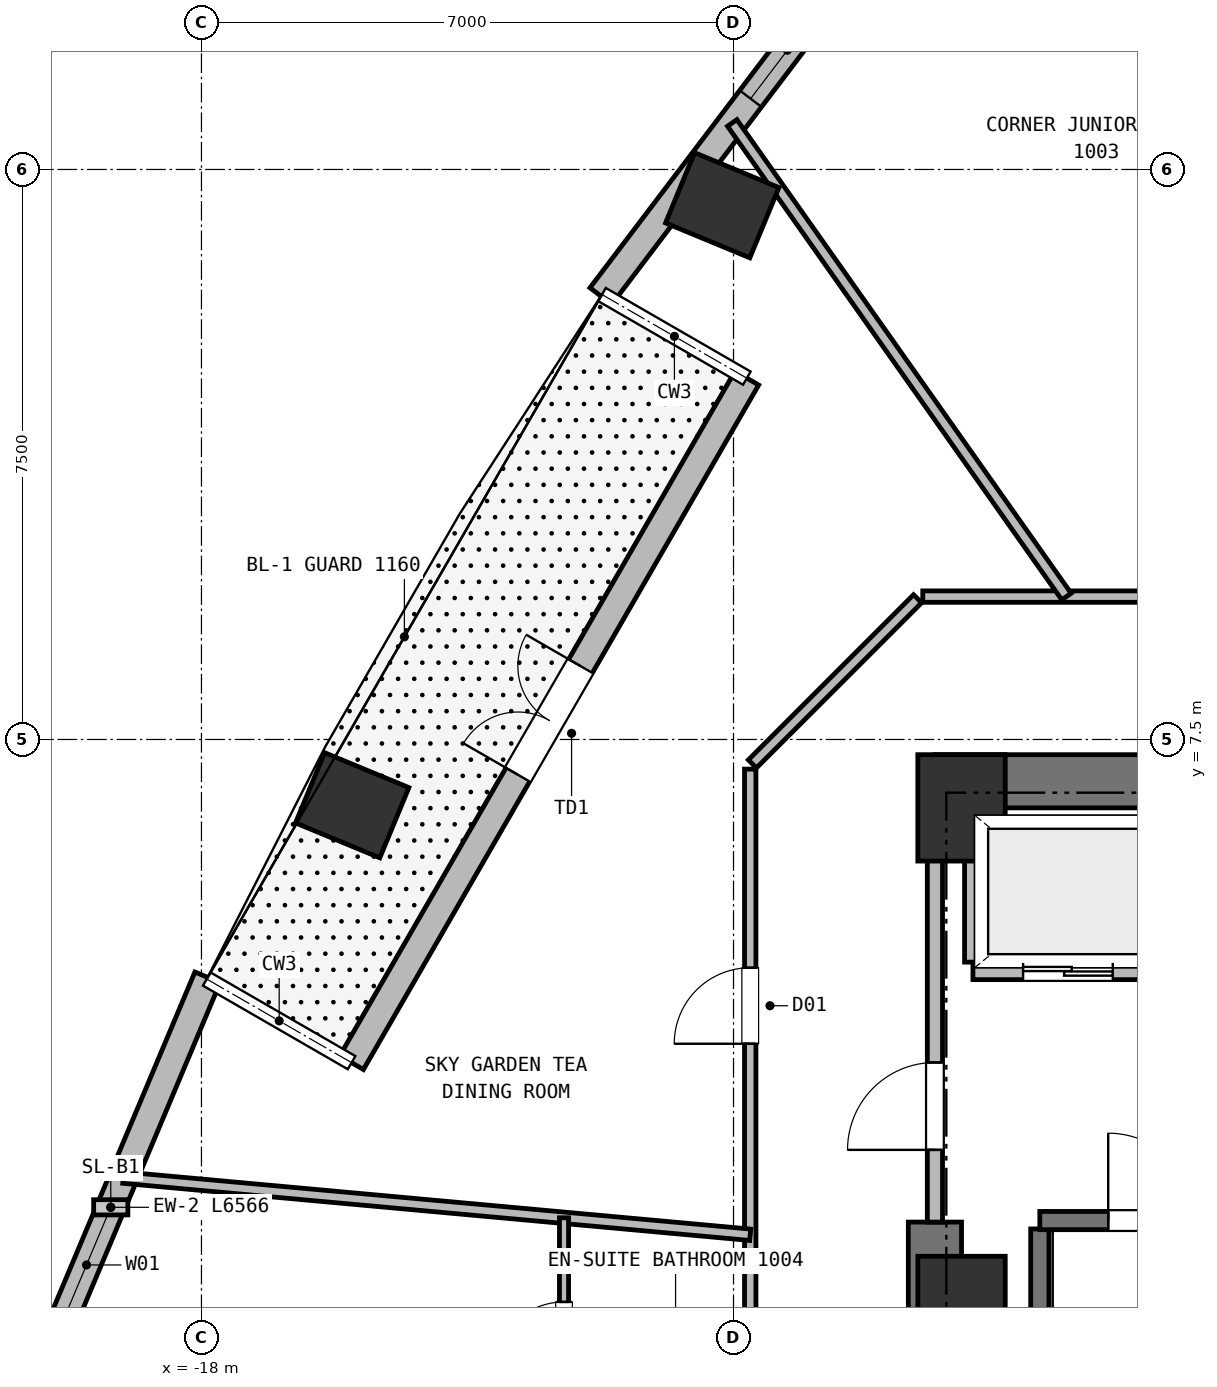
"""IFC4 building model, lengths in metres.
Left out: names, types, materials, properties, quantities, classifications, styles, units other than length and angle.
Written with IfcOpenShell. Run it as: python <this file> out.ifc"""

import sys

from ifc_helpers import new_model, si_unit, direction, frame, frame_2d, origin, origin_2d, place, context, subcontext, project, spatial, rectangle, extrude, element, fill, save


model = new_model("IFC4")
c1 = context("Model", 3, precision=1e-05, world=origin(), true_north=direction((0.0, 1.0)))
c2 = subcontext(c1, "Body", "Model", "MODEL_VIEW")
j1 = project(units=[si_unit("LENGTHUNIT", "METRE"), si_unit("PLANEANGLEUNIT", "RADIAN")], contexts=[c1])
p1 = place(None, origin())
s1 = spatial("IfcSite", under=j1, at=p1, CompositionType="ELEMENT")
p2 = place(p1, origin())
s2 = spatial("IfcBuilding", under=s1, at=p2, CompositionType="ELEMENT")
p3 = place(p2, frame((0.0, 0.0, 34.25)))
s3 = spatial("IfcBuildingStorey", under=s2, at=p3, CompositionType="ELEMENT", Elevation=34.25)
for number, where, z_axis, x_axis in (
    (1, (-8.0, 6.6, 0.0), (0.0, 0.0, 1.0), (1.0, 0.0, 0.0)),
    (2, (-8.0, 0.0, 0.0), (0.0, 0.0, 1.0), (1.0, 0.0, 0.0)),
):
    element("IfcColumn", number, at=place(p3, frame(where, z_axis=z_axis, x_axis=x_axis)), inside=s3, PredefinedType="COLUMN", context=c2, shape_type="SweptSolid", body=[
        extrude(rectangle(XDim=1.15, YDim=1.4, at=origin_2d()), origin(), (0.0, 0.0, 1.0), 3.75),
    ])
p4 = place(p3, frame((-8.35, 6.95, 0.0), z_axis=(0.0, 0.0, 1.0), x_axis=(1.0, 0.0, 0.0)))
e3 = element("IfcWall", 3, at=p4, inside=s3, PredefinedType="SHEAR", context=c2, shape_type="SweptSolid", body=[
    extrude(rectangle(XDim=16.7, YDim=0.7, at=frame_2d((8.35, 0.0))), origin(), (0.0, 0.0, 1.0), 3.5),
])
p5 = place(p3, frame((-8.35, -6.95, 0.0), z_axis=(0.0, 0.0, 1.0), x_axis=(0.0, 1.0, 0.0)))
e4 = element("IfcWall", 4, at=p5, inside=s3, PredefinedType="SHEAR", context=c2, shape_type="SweptSolid", body=[
    extrude(rectangle(XDim=8.1, YDim=0.7, at=frame_2d((4.05, 0.0))), origin(), (0.0, 0.0, 1.0), 3.5),
])
for number, where, z_axis, x_axis in (
    (5, (-11.148, 14.529, 0.0), (0.0, 0.0, 1.0), (0.383, 0.924, 0.0)),
    (6, (-16.017, 6.635, 0.0), (0.0, 0.0, 1.0), (0.383, 0.924, 0.0)),
):
    element("IfcColumn", number, at=place(p3, frame(where, z_axis=z_axis, x_axis=x_axis)), inside=s3, PredefinedType="COLUMN", context=c2, shape_type="SweptSolid", body=[
        extrude(rectangle(XDim=1.0, YDim=1.2, at=origin_2d()), origin(), (0.0, 0.0, 1.0), 3.75),
    ])
p6 = place(p3, frame((-16.025, 3.248, 0.0), z_axis=(0.0, 0.0, 1.0), x_axis=(0.499999493275, 0.866025696342, 0.0)))
e7 = element("IfcWall", 7, at=p6, inside=s3, PredefinedType="SOLIDWALL", context=c2, shape_type="SweptSolid", body=[
    extrude(rectangle(XDim=10.4, YDim=0.36, at=frame_2d((5.2, 0.0))), origin(), (0.0, 0.0, 1.0), 3.5),
])
p7 = place(p6, frame((4.375, 0.0, 0.0)))
e8 = element("IfcOpeningElement", 8, at=p7, cuts=e7, PredefinedType="OPENING", context=c2, shape_type="SweptSolid", body=[
    extrude(rectangle(XDim=1.65, YDim=2.25, at=frame_2d((0.825, 1.125))), frame((0.0, 0.19, 0.0), z_axis=(0.0, -1.0, 0.0), x_axis=(1.0, 0.0, 0.0)), (0.0, 0.0, 1.0), 0.38),
])
p8 = place(p3, frame((-12.745, 13.334, 0.0), z_axis=(0.0, 0.0, 1.0), x_axis=(0.604405198851, 0.796677071091, 0.0)))
e9 = element("IfcWall", 9, at=p8, inside=s3, PredefinedType="SOLIDWALL", context=c2, shape_type="SweptSolid", body=[
    extrude(rectangle(XDim=6.566, YDim=0.36, at=frame_2d((3.283, 0.0))), origin(), (0.0, 0.0, 1.0), 2.93),
])
p9 = place(p8, frame((3.26, 0.0, 0.72)))
e10 = element("IfcOpeningElement", 10, at=p9, cuts=e9, PredefinedType="OPENING", context=c2, shape_type="SweptSolid", body=[
    extrude(rectangle(XDim=1.6, YDim=1.88, at=frame_2d((0.8, 0.94))), frame((0.0, 0.19, 0.0), z_axis=(0.0, -1.0, 0.0), x_axis=(1.0, 0.0, 0.0)), (0.0, 0.0, 1.0), 0.38),
])
p10 = place(p3, frame((-20.466, -1.682, 0.0), z_axis=(0.0, 0.0, 1.0), x_axis=(0.387744465456, 0.921766906277, 0.0)))
e11 = element("IfcWall", 11, at=p10, inside=s3, PredefinedType="SOLIDWALL", context=c2, shape_type="SweptSolid", body=[
    extrude(rectangle(XDim=6.566, YDim=0.36, at=frame_2d((3.283, 0.0))), origin(), (0.0, 0.0, 1.0), 3.5),
])
p11 = place(p10, frame((1.66, 0.0, 0.72)))
e12 = element("IfcOpeningElement", 12, at=p11, cuts=e11, PredefinedType="OPENING", context=c2, shape_type="SweptSolid", body=[
    extrude(rectangle(XDim=1.6, YDim=1.88, at=frame_2d((0.8, 0.94))), frame((0.0, 0.19, 0.0), z_axis=(0.0, -1.0, 0.0), x_axis=(1.0, 0.0, 0.0)), (0.0, 0.0, 1.0), 0.38),
])
p12 = place(p3, frame((-6.97, -6.16, 0.0), z_axis=(0.0, 0.0, 1.0), x_axis=(0.0, 1.0, 0.0)))
e13 = element("IfcWall", 13, at=p12, inside=s3, PredefinedType="SHEAR", context=c2, shape_type="SweptSolid", body=[
    extrude(rectangle(XDim=7.22, YDim=0.24, at=frame_2d((3.61, 0.0))), origin(), (0.0, 0.0, 1.0), 3.5),
])
p13 = place(p3, frame((-6.97, 1.17, 0.0), z_axis=(0.0, 0.0, 1.0), x_axis=(1.0, 0.0, 0.0)))
e14 = element("IfcWall", 14, at=p13, inside=s3, PredefinedType="SHEAR", context=c2, shape_type="SweptSolid", body=[
    extrude(rectangle(XDim=2.96, YDim=0.24, at=frame_2d((1.48, 0.0))), origin(), (0.0, 0.0, 1.0), 3.5),
])
p14 = place(p13, frame((0.9, 0.0, 0.0)))
e15 = element("IfcOpeningElement", 15, at=p14, cuts=e14, PredefinedType="OPENING", context=c2, shape_type="SweptSolid", body=[
    extrude(rectangle(XDim=1.15, YDim=2.15, at=frame_2d((0.575, 1.075))), frame((0.0, 0.13, 0.0), z_axis=(0.0, -1.0, 0.0), x_axis=(1.0, 0.0, 0.0)), (0.0, 0.0, 1.0), 0.26),
])
p15 = place(p3, frame((-7.85, 4.45, 0.0), z_axis=(0.0, 0.0, 1.0), x_axis=(1.0, 0.0, 0.0)))
e16 = element("IfcWall", 16, at=p15, inside=s3, PredefinedType="PARTITIONING", context=c2, shape_type="SweptSolid", body=[
    extrude(rectangle(XDim=2.5, YDim=0.22, at=frame_2d((1.25, 0.0))), origin(), (0.0, 0.0, 1.0), 3.5),
])
p16 = place(p15, frame((0.66, 0.0, 0.0)))
e17 = element("IfcOpeningElement", 17, at=p16, cuts=e16, PredefinedType="OPENING", context=c2, shape_type="SweptSolid", body=[
    extrude(rectangle(XDim=1.18, YDim=2.15, at=frame_2d((0.59, 1.075))), frame((0.0, 0.12, 0.0), z_axis=(0.0, -1.0, 0.0), x_axis=(1.0, 0.0, 0.0)), (0.0, 0.0, 1.0), 0.24),
])
p17 = place(p3, frame((-7.85, 4.57, 0.0), z_axis=(0.0, 0.0, 1.0), x_axis=(0.0, 1.0, 0.0)))
e18 = element("IfcWall", 18, at=p17, inside=s3, PredefinedType="PARTITIONING", context=c2, shape_type="SweptSolid", body=[
    extrude(rectangle(XDim=2.03, YDim=0.22, at=frame_2d((1.015, 0.0))), origin(), (0.0, 0.0, 1.0), 3.08),
])
p18 = place(p3, frame((-8.35, 1.15, 0.0), z_axis=(0.0, 0.0, 1.0), x_axis=(0.0, 1.0, 0.0)))
e19 = element("IfcWall", 19, at=p18, inside=s3, PredefinedType="PARTITIONING", context=c2, shape_type="SweptSolid", body=[
    extrude(rectangle(XDim=5.4, YDim=0.2, at=frame_2d((2.7, 0.0))), origin(), (0.0, 0.0, 1.0), 3.5),
])
p19 = place(p18, frame((0.95, 0.0, 0.0)))
e20 = element("IfcOpeningElement", 20, at=p19, cuts=e19, PredefinedType="OPENING", context=c2, shape_type="SweptSolid", body=[
    extrude(rectangle(XDim=1.15, YDim=2.15, at=frame_2d((0.575, 1.075))), frame((0.0, 0.11, 0.0), z_axis=(0.0, -1.0, 0.0), x_axis=(1.0, 0.0, 0.0)), (0.0, 0.0, 1.0), 0.22),
])
p20 = place(p3, frame((-8.51, 9.38, 0.0), z_axis=(0.0, 0.0, 1.0), x_axis=(1.0, 0.0, 0.0)))
e21 = element("IfcWall", 21, at=p20, inside=s3, PredefinedType="PARTITIONING", context=c2, shape_type="SweptSolid", body=[
    extrude(rectangle(XDim=17.02, YDim=0.15, at=frame_2d((8.51, 0.0))), origin(), (0.0, 0.0, 1.0), 3.5),
])
p21 = place(p20, frame((13.545, 0.0, 0.0)))
e22 = element("IfcOpeningElement", 22, at=p21, cuts=e21, PredefinedType="OPENING", context=c2, shape_type="SweptSolid", body=[
    extrude(rectangle(XDim=1.0, YDim=2.15, at=frame_2d((0.5, 1.075))), frame((0.0, 0.085, 0.0), z_axis=(0.0, -1.0, 0.0), x_axis=(1.0, 0.0, 0.0)), (0.0, 0.0, 1.0), 0.17),
])
p22 = place(p20, frame((3.095, 0.0, 0.0)))
e23 = element("IfcOpeningElement", 23, at=p22, cuts=e21, PredefinedType="OPENING", context=c2, shape_type="SweptSolid", body=[
    extrude(rectangle(XDim=1.06, YDim=2.15, at=frame_2d((0.53, 1.075))), frame((0.0, 0.085, 0.0), z_axis=(0.0, -1.0, 0.0), x_axis=(1.0, 0.0, 0.0)), (0.0, 0.0, 1.0), 0.17),
])
p23 = place(p20, frame((8.402, 0.0, 0.0)))
e24 = element("IfcOpeningElement", 24, at=p23, cuts=e21, PredefinedType="OPENING", context=c2, shape_type="SweptSolid", body=[
    extrude(rectangle(XDim=1.06, YDim=2.15, at=frame_2d((0.53, 1.075))), frame((0.0, 0.085, 0.0), z_axis=(0.0, -1.0, 0.0), x_axis=(1.0, 0.0, 0.0)), (0.0, 0.0, 1.0), 0.17),
])
p24 = place(p3, frame((-10.752, 7.178, 0.0), z_axis=(0.0, 0.0, 1.0), x_axis=(0.707067066127, 0.707146494016, 0.0)))
e25 = element("IfcWall", 25, at=p24, inside=s3, PredefinedType="PARTITIONING", context=c2, shape_type="SweptSolid", body=[
    extrude(rectangle(XDim=3.074, YDim=0.15, at=frame_2d((1.537, 0.0))), origin(), (0.0, 0.0, 1.0), 3.5),
])
p25 = place(p3, frame((-10.78, -7.11, 0.0), z_axis=(0.0, 0.0, 1.0), x_axis=(0.0, 1.0, 0.0)))
e26 = element("IfcWall", 26, at=p25, inside=s3, PredefinedType="PARTITIONING", context=c2, shape_type="SweptSolid", body=[
    extrude(rectangle(XDim=14.22, YDim=0.15, at=frame_2d((7.11, 0.0))), origin(), (0.0, 0.0, 1.0), 3.12),
])
p26 = place(p25, frame((10.606, 0.0, 0.0)))
e27 = element("IfcOpeningElement", 27, at=p26, cuts=e26, PredefinedType="OPENING", context=c2, shape_type="SweptSolid", body=[
    extrude(rectangle(XDim=1.0, YDim=2.15, at=frame_2d((0.5, 1.075))), frame((0.0, 0.085, 0.0), z_axis=(0.0, -1.0, 0.0), x_axis=(1.0, 0.0, 0.0)), (0.0, 0.0, 1.0), 0.17),
])
p27 = place(p25, frame((3.57, 0.0, 0.0)))
e28 = element("IfcOpeningElement", 28, at=p27, cuts=e26, PredefinedType="OPENING", context=c2, shape_type="SweptSolid", body=[
    extrude(rectangle(XDim=1.06, YDim=2.15, at=frame_2d((0.53, 1.075))), frame((0.0, 0.085, 0.0), z_axis=(0.0, -1.0, 0.0), x_axis=(1.0, 0.0, 0.0)), (0.0, 0.0, 1.0), 0.17),
])
p28 = place(p3, frame((-6.619, 9.38, 0.0), z_axis=(0.0, 0.0, 1.0), x_axis=(-0.576560044714, 0.817054780807, 0.0)))
e29 = element("IfcWall", 29, at=p28, inside=s3, PredefinedType="PARTITIONING", context=c2, shape_type="SweptSolid", body=[
    extrude(rectangle(XDim=7.628, YDim=0.15, at=frame_2d((3.814, 0.0))), origin(), (0.0, 0.0, 1.0), 3.5),
])
p29 = place(p3, frame((-10.78, 0.983, 0.0), z_axis=(0.0, 0.0, 1.0), x_axis=(-0.995868528088, 0.090806799107, 0.0)))
e30 = element("IfcWall", 30, at=p29, inside=s3, PredefinedType="PARTITIONING", context=c2, shape_type="SweptSolid", body=[
    extrude(rectangle(XDim=8.283, YDim=0.15, at=frame_2d((4.142, 0.0))), origin(), (0.0, 0.0, 1.0), 3.5),
])
p30 = place(p3, frame((-13.23, -1.928, 0.0), z_axis=(0.0, 0.0, 1.0), x_axis=(0.0, 1.0, 0.0)))
e31 = element("IfcWall", 31, at=p30, inside=s3, PredefinedType="PARTITIONING", context=c2, shape_type="SweptSolid", body=[
    extrude(rectangle(XDim=3.134, YDim=0.12, at=frame_2d((1.567, 0.0))), origin(), (0.0, 0.0, 1.0), 3.12),
])
p31 = place(p30, frame((1.107, 0.0, 0.0)))
e32 = element("IfcOpeningElement", 32, at=p31, cuts=e31, PredefinedType="OPENING", context=c2, shape_type="SweptSolid", body=[
    extrude(rectangle(XDim=0.92, YDim=2.1, at=frame_2d((0.46, 1.05))), frame((0.0, 0.07, 0.0), z_axis=(0.0, -1.0, 0.0), x_axis=(1.0, 0.0, 0.0)), (0.0, 0.0, 1.0), 0.14),
])
p32 = place(p7, origin())
e33 = element("IfcDoor", 33, at=p32, inside=s3, OperationType="DOUBLE_DOOR_SINGLE_SWING", PredefinedType="DOOR", context=c2, shape_type="SweptSolid", body=[
    extrude(rectangle(XDim=1.65, YDim=2.25, at=frame_2d((0.825, 1.125))), frame((0.0, 0.025, 0.0), z_axis=(0.0, -1.0, 0.0), x_axis=(1.0, 0.0, 0.0)), (0.0, 0.0, 1.0), 0.05),
])
fill(e8, e33)
p33 = place(p9, origin())
e34 = element("IfcWindow", 34, at=p33, inside=s3, PartitioningType="SINGLE_PANEL", PredefinedType="WINDOW", context=c2, shape_type="SweptSolid", body=[
    extrude(rectangle(XDim=1.6, YDim=1.88, at=frame_2d((0.8, 0.94))), frame((0.0, 0.03, 0.0), z_axis=(0.0, -1.0, 0.0), x_axis=(1.0, 0.0, 0.0)), (0.0, 0.0, 1.0), 0.06),
])
fill(e10, e34)
p34 = place(p11, origin())
e35 = element("IfcWindow", 35, at=p34, inside=s3, PartitioningType="SINGLE_PANEL", PredefinedType="WINDOW", context=c2, shape_type="SweptSolid", body=[
    extrude(rectangle(XDim=1.6, YDim=1.88, at=frame_2d((0.8, 0.94))), frame((0.0, 0.03, 0.0), z_axis=(0.0, -1.0, 0.0), x_axis=(1.0, 0.0, 0.0)), (0.0, 0.0, 1.0), 0.06),
])
fill(e12, e35)
p35 = place(p14, origin())
e36 = element("IfcDoor", 36, at=p35, inside=s3, OperationType="SINGLE_SWING_LEFT", PredefinedType="DOOR", context=c2, shape_type="SweptSolid", body=[
    extrude(rectangle(XDim=1.15, YDim=2.15, at=frame_2d((0.575, 1.075))), frame((0.0, 0.025, 0.0), z_axis=(0.0, -1.0, 0.0), x_axis=(1.0, 0.0, 0.0)), (0.0, 0.0, 1.0), 0.05),
])
fill(e15, e36)
p36 = place(p16, origin())
e37 = element("IfcDoor", 37, at=p36, inside=s3, OperationType="DOUBLE_DOOR_SLIDING", PredefinedType="DOOR", context=c2, shape_type="SweptSolid", body=[
    extrude(rectangle(XDim=1.18, YDim=2.15, at=frame_2d((0.59, 1.075))), frame((0.0, 0.025, 0.0), z_axis=(0.0, -1.0, 0.0), x_axis=(1.0, 0.0, 0.0)), (0.0, 0.0, 1.0), 0.05),
])
fill(e17, e37)
p37 = place(p19, origin())
e38 = element("IfcDoor", 38, at=p37, inside=s3, OperationType="SINGLE_SWING_LEFT", PredefinedType="DOOR", context=c2, shape_type="SweptSolid", body=[
    extrude(rectangle(XDim=1.15, YDim=2.15, at=frame_2d((0.575, 1.075))), frame((0.0, 0.025, 0.0), z_axis=(0.0, -1.0, 0.0), x_axis=(1.0, 0.0, 0.0)), (0.0, 0.0, 1.0), 0.05),
])
fill(e20, e38)
p38 = place(p31, origin())
e39 = element("IfcDoor", 39, at=p38, inside=s3, OperationType="SINGLE_SWING_LEFT", PredefinedType="DOOR", context=c2, shape_type="SweptSolid", body=[
    extrude(rectangle(XDim=0.92, YDim=2.1, at=frame_2d((0.46, 1.05))), frame((0.0, 0.025, 0.0), z_axis=(0.0, -1.0, 0.0), x_axis=(1.0, 0.0, 0.0)), (0.0, 0.0, 1.0), 0.05),
])
fill(e32, e39)
p39 = place(p26, origin())
e40 = element("IfcDoor", 40, at=p39, inside=s3, OperationType="SINGLE_SWING_LEFT", PredefinedType="DOOR", context=c2, shape_type="SweptSolid", body=[
    extrude(rectangle(XDim=1.0, YDim=2.15, at=frame_2d((0.5, 1.075))), frame((0.0, 0.025, 0.0), z_axis=(0.0, -1.0, 0.0), x_axis=(1.0, 0.0, 0.0)), (0.0, 0.0, 1.0), 0.05),
])
fill(e27, e40)
save(model, sys.argv[1])
